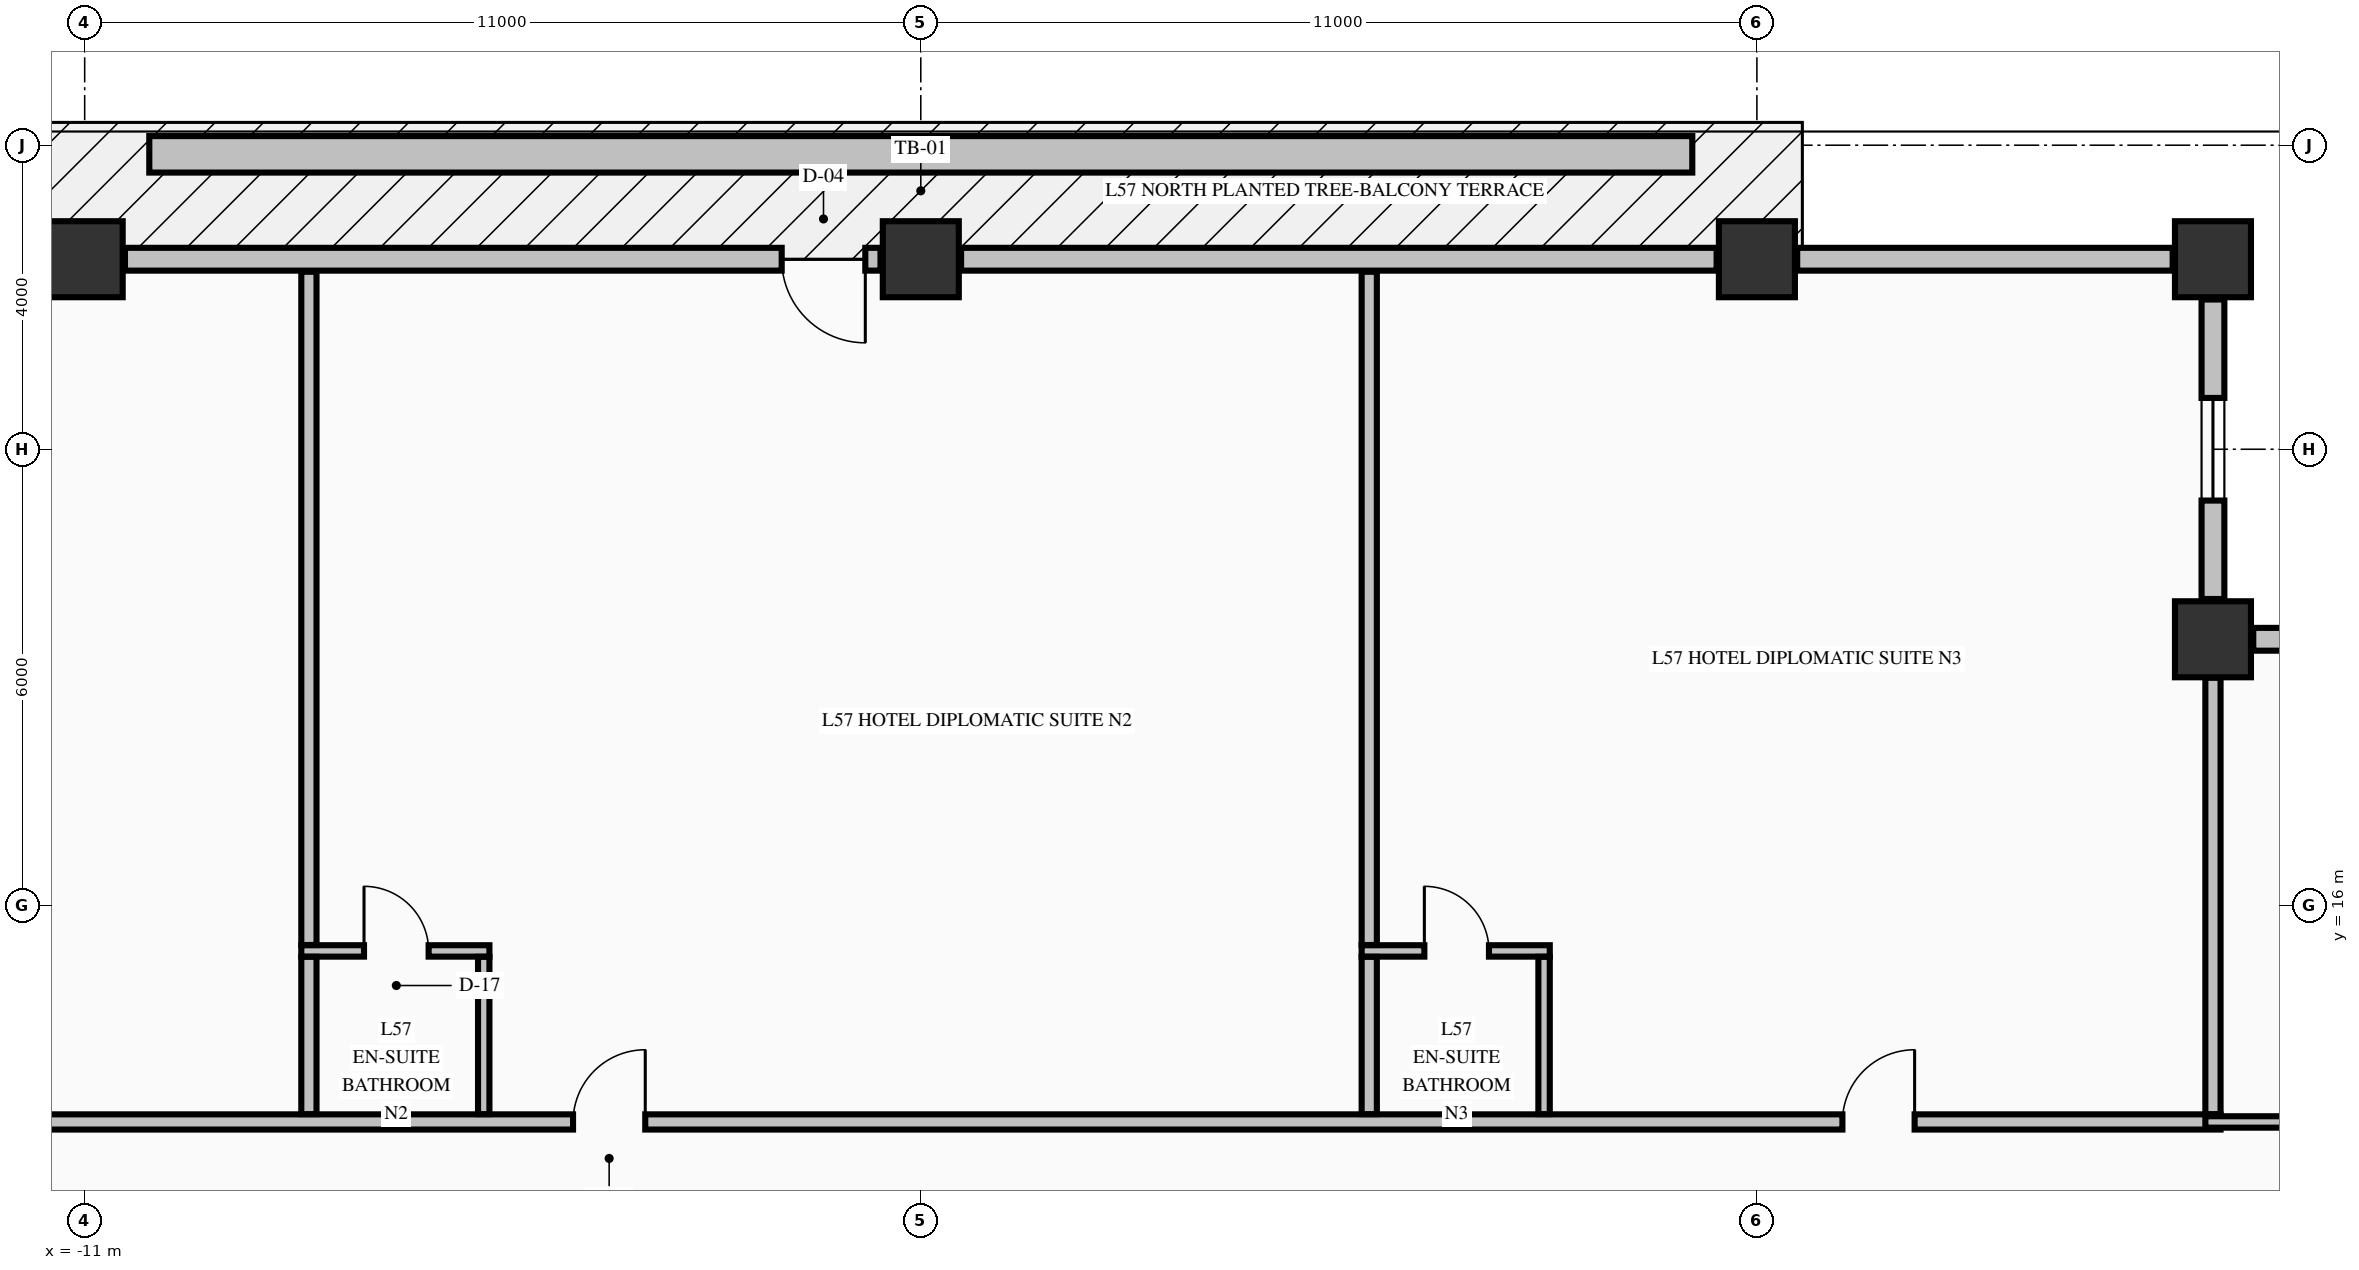
"""IFC4 building model, lengths in metres.
Left out: names, types, materials, properties, quantities, classifications, styles, units other than length and angle.
Written with IfcOpenShell. Run it as: python <this file> out.ifc"""

import sys

from ifc_helpers import new_model, si_unit, direction, frame, frame_2d, origin, origin_2d, place, context, subcontext, project, spatial, rectangle, extrude, element, fill, save


model = new_model("IFC4")
c1 = context("Model", 3, precision=1e-05, world=origin(), true_north=direction((0.0, 1.0)))
c2 = subcontext(c1, "Body", "Model", "MODEL_VIEW")
j1 = project(units=[si_unit("LENGTHUNIT", "METRE"), si_unit("PLANEANGLEUNIT", "RADIAN")], contexts=[c1])
p1 = place(None, origin())
s1 = spatial("IfcSite", under=j1, at=p1, CompositionType="ELEMENT")
p2 = place(p1, origin())
s2 = spatial("IfcBuilding", under=s1, at=p2, CompositionType="ELEMENT")
p3 = place(p2, frame((0.0, 0.0, 218.66)))
s3 = spatial("IfcBuildingStorey", under=s2, at=p3, CompositionType="ELEMENT", Elevation=218.66)
for number, where, z_axis, x_axis in (
    (1, (-11.0, 24.5, -0.25), (0.0, 0.0, 1.0), (1.0, 0.0, 0.0)),
    (2, (0.0, 24.5, -0.25), (0.0, 0.0, 1.0), (1.0, 0.0, 0.0)),
    (3, (11.0, 24.5, -0.25), (0.0, 0.0, 1.0), (1.0, 0.0, 0.0)),
    (4, (17.0, 24.5, -0.25), (0.0, 0.0, 1.0), (1.0, 0.0, 0.0)),
    (5, (17.0, 19.5, -0.25), (0.0, 0.0, 1.0), (1.0, 0.0, 0.0)),
):
    element("IfcColumn", number, at=place(p3, frame(where, z_axis=z_axis, x_axis=x_axis)), inside=s3, PredefinedType="COLUMN", context=c2, shape_type="SweptSolid", body=[
        extrude(rectangle(XDim=1.0, YDim=1.0, at=origin_2d()), origin(), (0.0, 0.0, 1.0), 3.225),
    ])
p4 = place(p3, frame((21.47, 19.5, 0.0), z_axis=(0.0, 0.0, 1.0), x_axis=(-1.0, 0.0, 0.0)))
e6 = element("IfcWall", 6, at=p4, inside=s3, PredefinedType="STANDARD", context=c2, shape_type="SweptSolid", body=[
    extrude(rectangle(XDim=3.94, YDim=0.3, at=frame_2d((1.97, 0.0))), origin(), (0.0, 0.0, 1.0), 2.367),
])
p5 = place(p4, frame((1.295, 0.0, 0.68)))
e7 = element("IfcOpeningElement", 7, at=p5, cuts=e6, PredefinedType="OPENING", context=c2, shape_type="SweptSolid", body=[
    extrude(rectangle(XDim=1.35, YDim=1.42, at=frame_2d((0.675, 0.71))), frame((0.0, 0.16, 0.0), z_axis=(0.0, -1.0, 0.0), x_axis=(1.0, 0.0, 0.0)), (0.0, 0.0, 1.0), 0.32),
])
p6 = place(p3, frame((17.0, 20.03, 0.0), z_axis=(0.0, 0.0, 1.0), x_axis=(0.0, 1.0, 0.0)))
e8 = element("IfcWall", 8, at=p6, inside=s3, PredefinedType="STANDARD", context=c2, shape_type="SweptSolid", body=[
    extrude(rectangle(XDim=3.94, YDim=0.3, at=frame_2d((1.97, 0.0))), origin(), (0.0, 0.0, 1.0), 2.367),
])
p7 = place(p6, frame((1.295, 0.0, 0.68)))
e9 = element("IfcOpeningElement", 9, at=p7, cuts=e8, PredefinedType="OPENING", context=c2, shape_type="SweptSolid", body=[
    extrude(rectangle(XDim=1.35, YDim=1.42, at=frame_2d((0.675, 0.71))), frame((0.0, 0.16, 0.0), z_axis=(0.0, -1.0, 0.0), x_axis=(1.0, 0.0, 0.0)), (0.0, 0.0, 1.0), 0.32),
])
p8 = place(p3, frame((-0.53, 24.5, 0.0), z_axis=(0.0, 0.0, 1.0), x_axis=(-1.0, 0.0, 0.0)))
e10 = element("IfcWall", 10, at=p8, inside=s3, PredefinedType="STANDARD", context=c2, shape_type="SweptSolid", body=[
    extrude(rectangle(XDim=9.94, YDim=0.3, at=frame_2d((4.97, 0.0))), origin(), (0.0, 0.0, 1.0), 2.367),
])
p9 = place(p8, frame((0.2, 0.0, 0.0)))
e11 = element("IfcOpeningElement", 11, at=p9, cuts=e10, PredefinedType="OPENING", context=c2, shape_type="SweptSolid", body=[
    extrude(rectangle(XDim=1.1, YDim=2.15, at=frame_2d((0.55, 1.075))), frame((0.0, 0.16, 0.0), z_axis=(0.0, -1.0, 0.0), x_axis=(1.0, 0.0, 0.0)), (0.0, 0.0, 1.0), 0.32),
])
p10 = place(p3, frame((10.47, 24.5, 0.0), z_axis=(0.0, 0.0, 1.0), x_axis=(-1.0, 0.0, 0.0)))
e12 = element("IfcWall", 12, at=p10, inside=s3, PredefinedType="STANDARD", context=c2, shape_type="SweptSolid", body=[
    extrude(rectangle(XDim=9.94, YDim=0.3, at=frame_2d((4.97, 0.0))), origin(), (0.0, 0.0, 1.0), 2.367),
])
p11 = place(p3, frame((16.47, 24.5, 0.0), z_axis=(0.0, 0.0, 1.0), x_axis=(-1.0, 0.0, 0.0)))
e13 = element("IfcWall", 13, at=p11, inside=s3, PredefinedType="STANDARD", context=c2, shape_type="SweptSolid", body=[
    extrude(rectangle(XDim=4.94, YDim=0.3, at=frame_2d((2.47, 0.0))), origin(), (0.0, 0.0, 1.0), 2.367),
])
p12 = place(p3, frame((-22.1, 13.15, 0.0), z_axis=(0.0, 0.0, 1.0), x_axis=(1.0, 0.0, 0.0)))
e14 = element("IfcWall", 14, at=p12, inside=s3, PredefinedType="PARTITIONING", context=c2, shape_type="SweptSolid", body=[
    extrude(rectangle(XDim=39.2, YDim=0.2, at=frame_2d((19.6, 0.0))), origin(), (0.0, 0.0, 1.0), 2.975),
])
p13 = place(p12, frame((7.745, 0.0, 0.0)))
e15 = element("IfcOpeningElement", 15, at=p13, cuts=e14, PredefinedType="OPENING", context=c2, shape_type="SweptSolid", body=[
    extrude(rectangle(XDim=0.95, YDim=2.15, at=frame_2d((0.475, 1.075))), frame((0.0, 0.11, 0.0), z_axis=(0.0, -1.0, 0.0), x_axis=(1.0, 0.0, 0.0)), (0.0, 0.0, 1.0), 0.22),
])
p14 = place(p12, frame((17.525, 0.0, 0.0)))
e16 = element("IfcOpeningElement", 16, at=p14, cuts=e14, PredefinedType="OPENING", context=c2, shape_type="SweptSolid", body=[
    extrude(rectangle(XDim=0.95, YDim=2.15, at=frame_2d((0.475, 1.075))), frame((0.0, 0.11, 0.0), z_axis=(0.0, -1.0, 0.0), x_axis=(1.0, 0.0, 0.0)), (0.0, 0.0, 1.0), 0.22),
])
p15 = place(p12, frame((34.225, 0.0, 0.0)))
e17 = element("IfcOpeningElement", 17, at=p15, cuts=e14, PredefinedType="OPENING", context=c2, shape_type="SweptSolid", body=[
    extrude(rectangle(XDim=0.95, YDim=2.15, at=frame_2d((0.475, 1.075))), frame((0.0, 0.11, 0.0), z_axis=(0.0, -1.0, 0.0), x_axis=(1.0, 0.0, 0.0)), (0.0, 0.0, 1.0), 0.22),
])
p16 = place(p3, frame((16.9, 13.15, 0.0), z_axis=(0.0, 0.0, 1.0), x_axis=(1.0, 0.0, 0.0)))
e18 = element("IfcWall", 18, at=p16, inside=s3, PredefinedType="PARTITIONING", context=c2, shape_type="SweptSolid", body=[
    extrude(rectangle(XDim=3.175, YDim=0.15, at=frame_2d((1.587, 0.0))), origin(), (0.0, 0.0, 1.0), 2.975),
])
p17 = place(p3, frame((-8.15, 15.4, 0.0), z_axis=(0.0, 0.0, 1.0), x_axis=(1.0, 0.0, 0.0)))
e19 = element("IfcWall", 19, at=p17, inside=s3, PredefinedType="PARTITIONING", context=c2, shape_type="SweptSolid", body=[
    extrude(rectangle(XDim=2.475, YDim=0.15, at=frame_2d((1.237, 0.0))), origin(), (0.0, 0.0, 1.0), 2.975),
])
p18 = place(p17, frame((0.825, 0.0, 0.0)))
e20 = element("IfcOpeningElement", 20, at=p18, cuts=e19, PredefinedType="OPENING", context=c2, shape_type="SweptSolid", body=[
    extrude(rectangle(XDim=0.85, YDim=2.1, at=frame_2d((0.425, 1.05))), frame((0.0, 0.085, 0.0), z_axis=(0.0, -1.0, 0.0), x_axis=(1.0, 0.0, 0.0)), (0.0, 0.0, 1.0), 0.17),
])
p19 = place(p3, frame((5.8, 15.4, 0.0), z_axis=(0.0, 0.0, 1.0), x_axis=(1.0, 0.0, 0.0)))
e21 = element("IfcWall", 21, at=p19, inside=s3, PredefinedType="PARTITIONING", context=c2, shape_type="SweptSolid", body=[
    extrude(rectangle(XDim=2.475, YDim=0.15, at=frame_2d((1.237, 0.0))), origin(), (0.0, 0.0, 1.0), 2.975),
])
p20 = place(p19, frame((0.825, 0.0, 0.0)))
e22 = element("IfcOpeningElement", 22, at=p20, cuts=e21, PredefinedType="OPENING", context=c2, shape_type="SweptSolid", body=[
    extrude(rectangle(XDim=0.85, YDim=2.1, at=frame_2d((0.425, 1.05))), frame((0.0, 0.085, 0.0), z_axis=(0.0, -1.0, 0.0), x_axis=(1.0, 0.0, 0.0)), (0.0, 0.0, 1.0), 0.17),
])
p21 = place(p3, frame((-8.05, 13.253, 0.0), z_axis=(0.0, 0.0, 1.0), x_axis=(0.0, 1.0, 0.0)))
e23 = element("IfcWall", 23, at=p21, inside=s3, PredefinedType="PARTITIONING", context=c2, shape_type="SweptSolid", body=[
    extrude(rectangle(XDim=2.069, YDim=0.2, at=frame_2d((1.035, 0.0))), origin(), (0.0, 0.0, 1.0), 2.975),
])
p22 = place(p3, frame((-8.05, 15.478, 0.0), z_axis=(0.0, 0.0, 1.0), x_axis=(0.0, 1.0, 0.0)))
e24 = element("IfcWall", 24, at=p22, inside=s3, PredefinedType="PARTITIONING", context=c2, shape_type="SweptSolid", body=[
    extrude(rectangle(XDim=8.857, YDim=0.2, at=frame_2d((4.428, 0.0))), origin(), (0.0, 0.0, 1.0), 2.975),
])
p23 = place(p3, frame((-5.75, 13.253, 0.0), z_axis=(0.0, 0.0, 1.0), x_axis=(0.0, 1.0, 0.0)))
e25 = element("IfcWall", 25, at=p23, inside=s3, PredefinedType="PARTITIONING", context=c2, shape_type="SweptSolid", body=[
    extrude(rectangle(XDim=2.069, YDim=0.15, at=frame_2d((1.035, 0.0))), origin(), (0.0, 0.0, 1.0), 2.975),
])
p24 = place(p3, frame((5.9, 13.253, 0.0), z_axis=(0.0, 0.0, 1.0), x_axis=(0.0, 1.0, 0.0)))
e26 = element("IfcWall", 26, at=p24, inside=s3, PredefinedType="PARTITIONING", context=c2, shape_type="SweptSolid", body=[
    extrude(rectangle(XDim=2.069, YDim=0.2, at=frame_2d((1.035, 0.0))), origin(), (0.0, 0.0, 1.0), 2.975),
])
p25 = place(p3, frame((5.9, 15.478, 0.0), z_axis=(0.0, 0.0, 1.0), x_axis=(0.0, 1.0, 0.0)))
e27 = element("IfcWall", 27, at=p25, inside=s3, PredefinedType="PARTITIONING", context=c2, shape_type="SweptSolid", body=[
    extrude(rectangle(XDim=8.857, YDim=0.2, at=frame_2d((4.428, 0.0))), origin(), (0.0, 0.0, 1.0), 2.975),
])
p26 = place(p3, frame((8.2, 13.253, 0.0), z_axis=(0.0, 0.0, 1.0), x_axis=(0.0, 1.0, 0.0)))
e28 = element("IfcWall", 28, at=p26, inside=s3, PredefinedType="PARTITIONING", context=c2, shape_type="SweptSolid", body=[
    extrude(rectangle(XDim=2.069, YDim=0.15, at=frame_2d((1.035, 0.0))), origin(), (0.0, 0.0, 1.0), 2.975),
])
p27 = place(p3, frame((17.0, 13.253, 0.0), z_axis=(0.0, 0.0, 1.0), x_axis=(0.0, 1.0, 0.0)))
e29 = element("IfcWall", 29, at=p27, inside=s3, PredefinedType="PARTITIONING", context=c2, shape_type="SweptSolid", body=[
    extrude(rectangle(XDim=5.741, YDim=0.2, at=frame_2d((2.871, 0.0))), origin(), (0.0, 0.0, 1.0), 2.975),
])
p28 = place(p3, frame((-10.15, 25.88, -0.04), z_axis=(0.0, 0.0, 1.0), x_axis=(1.0, 0.0, 0.0)))
e30 = element("IfcWall", 30, at=p28, inside=s3, PredefinedType="PARAPET", context=c2, shape_type="SweptSolid", body=[
    extrude(rectangle(XDim=20.3, YDim=0.48, at=frame_2d((10.15, 0.0))), origin(), (0.0, 0.0, 1.0), 0.52),
])
p29 = place(p7, origin())
e31 = element("IfcWindow", 31, at=p29, inside=s3, PartitioningType="SINGLE_PANEL", PredefinedType="WINDOW", context=c2, shape_type="SweptSolid", body=[
    extrude(rectangle(XDim=1.35, YDim=1.42, at=frame_2d((0.675, 0.71))), frame((0.0, 0.03, 0.0), z_axis=(0.0, -1.0, 0.0), x_axis=(1.0, 0.0, 0.0)), (0.0, 0.0, 1.0), 0.06),
])
fill(e9, e31)
p30 = place(p9, origin())
e32 = element("IfcDoor", 32, at=p30, inside=s3, OperationType="SINGLE_SWING_LEFT", PredefinedType="DOOR", context=c2, shape_type="SweptSolid", body=[
    extrude(rectangle(XDim=1.1, YDim=2.15, at=frame_2d((0.55, 1.075))), frame((0.0, 0.025, 0.0), z_axis=(0.0, -1.0, 0.0), x_axis=(1.0, 0.0, 0.0)), (0.0, 0.0, 1.0), 0.05),
])
fill(e11, e32)
p31 = place(p14, origin())
e33 = element("IfcDoor", 33, at=p31, inside=s3, OperationType="SINGLE_SWING_RIGHT", PredefinedType="DOOR", context=c2, shape_type="SweptSolid", body=[
    extrude(rectangle(XDim=0.95, YDim=2.15, at=frame_2d((0.475, 1.075))), frame((0.0, 0.025, 0.0), z_axis=(0.0, -1.0, 0.0), x_axis=(1.0, 0.0, 0.0)), (0.0, 0.0, 1.0), 0.05),
])
fill(e16, e33)
p32 = place(p18, origin())
e34 = element("IfcDoor", 34, at=p32, inside=s3, OperationType="SINGLE_SWING_LEFT", PredefinedType="DOOR", context=c2, shape_type="SweptSolid", body=[
    extrude(rectangle(XDim=0.85, YDim=2.1, at=frame_2d((0.425, 1.05))), frame((0.0, 0.025, 0.0), z_axis=(0.0, -1.0, 0.0), x_axis=(1.0, 0.0, 0.0)), (0.0, 0.0, 1.0), 0.05),
])
fill(e20, e34)
p33 = place(p15, origin())
e35 = element("IfcDoor", 35, at=p33, inside=s3, OperationType="SINGLE_SWING_RIGHT", PredefinedType="DOOR", context=c2, shape_type="SweptSolid", body=[
    extrude(rectangle(XDim=0.95, YDim=2.15, at=frame_2d((0.475, 1.075))), frame((0.0, 0.025, 0.0), z_axis=(0.0, -1.0, 0.0), x_axis=(1.0, 0.0, 0.0)), (0.0, 0.0, 1.0), 0.05),
])
fill(e17, e35)
p34 = place(p20, origin())
e36 = element("IfcDoor", 36, at=p34, inside=s3, OperationType="SINGLE_SWING_LEFT", PredefinedType="DOOR", context=c2, shape_type="SweptSolid", body=[
    extrude(rectangle(XDim=0.85, YDim=2.1, at=frame_2d((0.425, 1.05))), frame((0.0, 0.025, 0.0), z_axis=(0.0, -1.0, 0.0), x_axis=(1.0, 0.0, 0.0)), (0.0, 0.0, 1.0), 0.05),
])
fill(e22, e36)
save(model, sys.argv[1])
